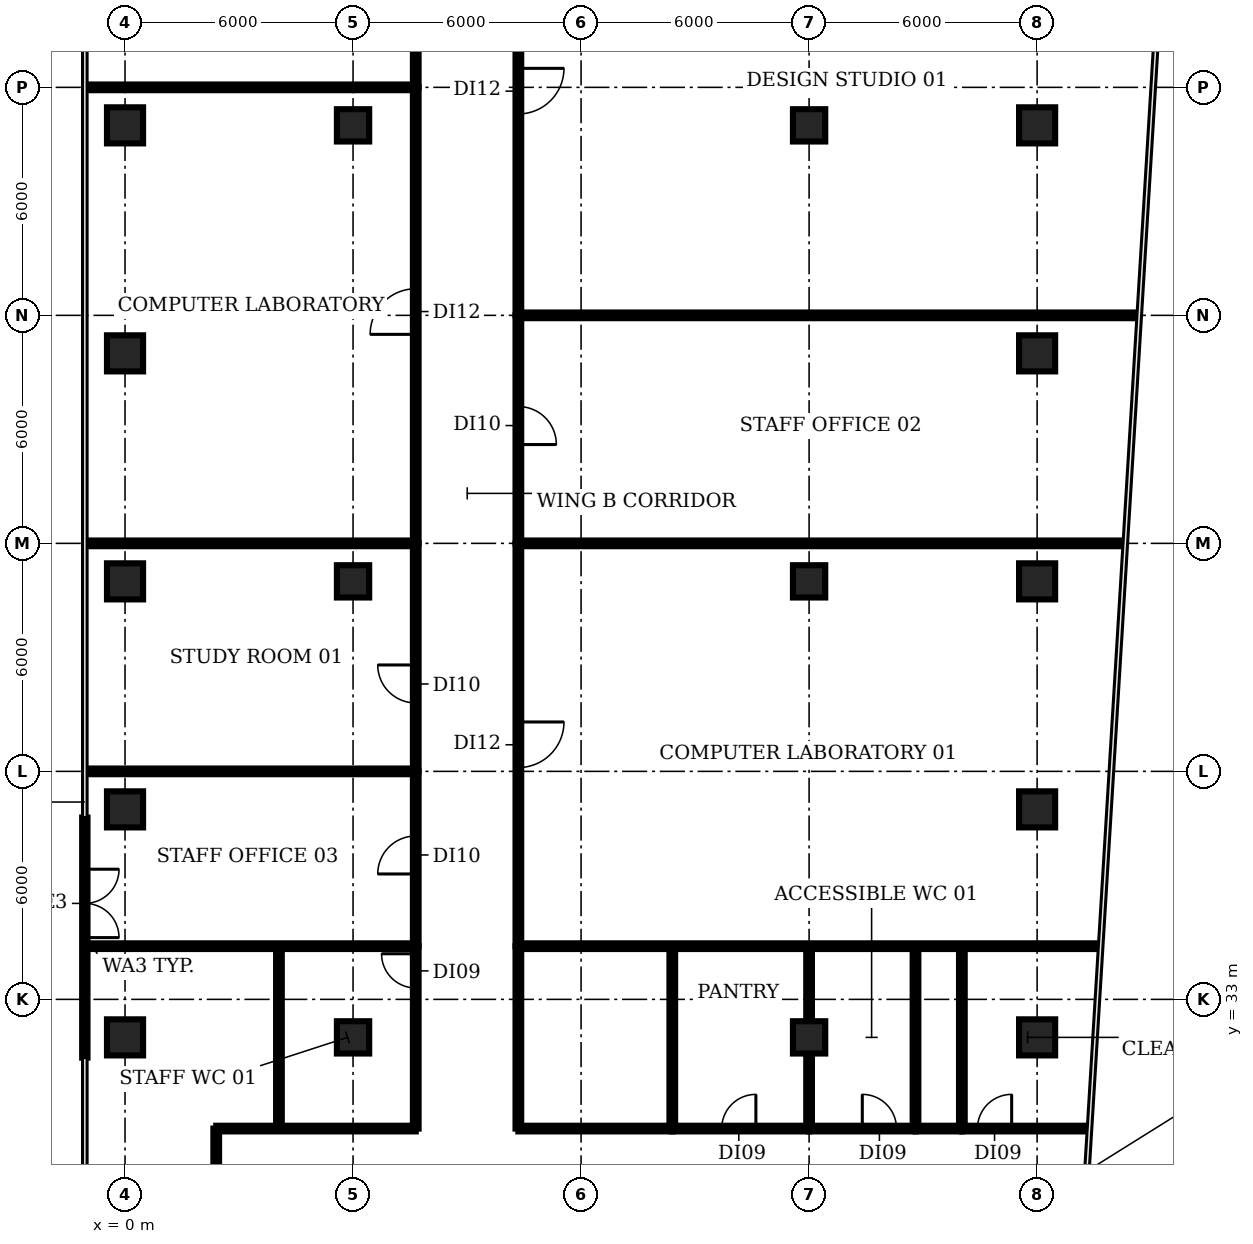
"""IFC4 building model, lengths in metres.
Left out: names, types, materials, properties, quantities, classifications, styles, units other than length and angle.
Written with IfcOpenShell. Run it as: python <this file> out.ifc"""

import sys

from ifc_helpers import new_model, si_unit, direction, frame, frame_2d, origin, origin_2d, place, context, subcontext, project, spatial, rectangle, extrude, element, fill, save


model = new_model("IFC4")
c1 = context("Model", 3, precision=1e-05, world=origin(), true_north=direction((0.0, 1.0)))
c2 = subcontext(c1, "Body", "Model", "MODEL_VIEW")
j1 = project(units=[si_unit("LENGTHUNIT", "METRE"), si_unit("PLANEANGLEUNIT", "RADIAN")], contexts=[c1])
p1 = place(None, origin())
s1 = spatial("IfcSite", under=j1, at=p1, CompositionType="ELEMENT")
p2 = place(p1, origin())
s2 = spatial("IfcBuilding", under=s1, at=p2, CompositionType="ELEMENT")
p3 = place(p2, frame((0.0, 0.0, 37.4)))
s3 = spatial("IfcBuildingStorey", under=s2, at=p3, CompositionType="ELEMENT", Elevation=37.4)
for number, where, z_axis, x_axis in (
    (1, (0.0, 32.0, 0.0), (0.0, 0.0, 1.0), (1.0, 0.0, 0.0)),
    (2, (0.0, 38.0, 0.0), (0.0, 0.0, 1.0), (1.0, 0.0, 0.0)),
    (3, (0.0, 44.0, 0.0), (0.0, 0.0, 1.0), (1.0, 0.0, 0.0)),
    (4, (0.0, 50.0, 0.0), (0.0, 0.0, 1.0), (1.0, 0.0, 0.0)),
    (5, (0.0, 56.0, 0.0), (0.0, 0.0, 1.0), (1.0, 0.0, 0.0)),
):
    element("IfcColumn", number, at=place(p3, frame(where, z_axis=z_axis, x_axis=x_axis)), inside=s3, PredefinedType="COLUMN", context=c2, shape_type="SweptSolid", body=[
        extrude(rectangle(XDim=0.95, YDim=0.95, at=origin_2d()), origin(), (0.0, 0.0, 1.0), 3.85),
    ])
for number, where, z_axis, x_axis in (
    (6, (6.0, 32.0, 0.0), (0.0, 0.0, 1.0), (1.0, 0.0, 0.0)),
    (7, (6.0, 44.0, 0.0), (0.0, 0.0, 1.0), (1.0, 0.0, 0.0)),
    (8, (6.0, 56.0, 0.0), (0.0, 0.0, 1.0), (1.0, 0.0, 0.0)),
    (9, (18.0, 32.0, 0.0), (0.0, 0.0, 1.0), (1.0, 0.0, 0.0)),
    (10, (18.0, 44.0, 0.0), (0.0, 0.0, 1.0), (1.0, 0.0, 0.0)),
    (11, (18.0, 56.0, 0.0), (0.0, 0.0, 1.0), (1.0, 0.0, 0.0)),
):
    element("IfcColumn", number, at=place(p3, frame(where, z_axis=z_axis, x_axis=x_axis)), inside=s3, PredefinedType="COLUMN", context=c2, shape_type="SweptSolid", body=[
        extrude(rectangle(XDim=0.85, YDim=0.85, at=origin_2d()), origin(), (0.0, 0.0, 1.0), 3.85),
    ])
for number, where, z_axis, x_axis in (
    (12, (24.0, 32.0, 0.0), (0.0, 0.0, 1.0), (1.0, 0.0, 0.0)),
    (13, (24.0, 38.0, 0.0), (0.0, 0.0, 1.0), (1.0, 0.0, 0.0)),
    (14, (24.0, 44.0, 0.0), (0.0, 0.0, 1.0), (1.0, 0.0, 0.0)),
    (15, (24.0, 50.0, 0.0), (0.0, 0.0, 1.0), (1.0, 0.0, 0.0)),
    (16, (24.0, 56.0, 0.0), (0.0, 0.0, 1.0), (1.0, 0.0, 0.0)),
):
    element("IfcColumn", number, at=place(p3, frame(where, z_axis=z_axis, x_axis=x_axis)), inside=s3, PredefinedType="COLUMN", context=c2, shape_type="SweptSolid", body=[
        extrude(rectangle(XDim=0.95, YDim=0.95, at=origin_2d()), origin(), (0.0, 0.0, 1.0), 3.85),
    ])
p4 = place(p3, frame((-1.058, 37.784, 0.0), z_axis=(0.0, 0.0, 1.0), x_axis=(0.0, -1.0, 0.0)))
e17 = element("IfcWall", 17, at=p4, inside=s3, PredefinedType="SOLIDWALL", context=c2, shape_type="SweptSolid", body=[
    extrude(rectangle(XDim=6.317, YDim=0.14, at=frame_2d((3.158, 0.0))), origin(), (0.0, 0.0, 1.0), 3.85),
])
p5 = place(p4, frame((1.359, 0.0, 0.0)))
e18 = element("IfcOpeningElement", 18, at=p5, cuts=e17, PredefinedType="OPENING", context=c2, shape_type="SweptSolid", body=[
    extrude(rectangle(XDim=1.8, YDim=2.4, at=frame_2d((0.9, 1.2))), frame((0.0, 0.08, 0.0), z_axis=(0.0, -1.0, 0.0), x_axis=(1.0, 0.0, 0.0)), (0.0, 0.0, 1.0), 0.16),
])
for number, where, z_axis, x_axis in (
    (19, (-1.01, 34.4, 0.0), (0.0, 0.0, 1.0), (1.0, 0.0, 0.0)),
    (20, (-1.01, 39.0, 0.0), (0.0, 0.0, 1.0), (1.0, 0.0, 0.0)),
    (21, (-1.01, 45.0, 0.0), (0.0, 0.0, 1.0), (1.0, 0.0, 0.0)),
    (22, (-1.01, 57.0, 0.0), (0.0, 0.0, 1.0), (1.0, 0.0, 0.0)),
):
    element("IfcWall", number, at=place(p3, frame(where, z_axis=z_axis, x_axis=x_axis)), inside=s3, PredefinedType="PARTITIONING", context=c2, shape_type="SweptSolid", body=[
        extrude(rectangle(XDim=8.66, YDim=0.15, at=frame_2d((4.33, 0.0))), origin(), (0.0, 0.0, 1.0), 2.83),
    ])
p6 = place(p3, frame((2.4, 25.7, 0.0), z_axis=(0.0, 0.0, 1.0), x_axis=(0.0, 1.0, 0.0)))
e23 = element("IfcWall", 23, at=p6, inside=s3, PredefinedType="PARTITIONING", context=c2, shape_type="SweptSolid", body=[
    extrude(rectangle(XDim=3.9, YDim=0.15, at=frame_2d((1.95, 0.0))), origin(), (0.0, 0.0, 1.0), 2.83),
])
p7 = place(p3, frame((2.4, 29.6, 0.0), z_axis=(0.0, 0.0, 1.0), x_axis=(1.0, 0.0, 0.0)))
e24 = element("IfcWall", 24, at=p7, inside=s3, PredefinedType="PARTITIONING", context=c2, shape_type="SweptSolid", body=[
    extrude(rectangle(XDim=5.25, YDim=0.15, at=frame_2d((2.625, 0.0))), origin(), (0.0, 0.0, 1.0), 2.83),
])
p8 = place(p3, frame((4.05, 29.6, 0.0), z_axis=(0.0, 0.0, 1.0), x_axis=(0.0, 1.0, 0.0)))
e25 = element("IfcWall", 25, at=p8, inside=s3, PredefinedType="PARTITIONING", context=c2, shape_type="SweptSolid", body=[
    extrude(rectangle(XDim=4.8, YDim=0.15, at=frame_2d((2.4, 0.0))), origin(), (0.0, 0.0, 1.0), 2.83),
])
p9 = place(p3, frame((7.65, 29.6, 0.0), z_axis=(0.0, 0.0, 1.0), x_axis=(0.0, 1.0, 0.0)))
e26 = element("IfcWall", 26, at=p9, inside=s3, PredefinedType="PARTITIONING", context=c2, shape_type="SweptSolid", body=[
    extrude(rectangle(XDim=4.8, YDim=0.15, at=frame_2d((2.4, 0.0))), origin(), (0.0, 0.0, 1.0), 2.83),
])
p10 = place(p9, frame((3.7, 0.0, 0.0)))
e27 = element("IfcOpeningElement", 27, at=p10, cuts=e26, PredefinedType="OPENING", context=c2, shape_type="SweptSolid", body=[
    extrude(rectangle(XDim=0.9, YDim=2.1, at=frame_2d((0.45, 1.05))), frame((0.0, 0.085, 0.0), z_axis=(0.0, -1.0, 0.0), x_axis=(1.0, 0.0, 0.0)), (0.0, 0.0, 1.0), 0.17),
])
p11 = place(p3, frame((7.65, 34.4, 0.0), z_axis=(0.0, 0.0, 1.0), x_axis=(0.0, 1.0, 0.0)))
e28 = element("IfcWall", 28, at=p11, inside=s3, PredefinedType="PARTITIONING", context=c2, shape_type="SweptSolid", body=[
    extrude(rectangle(XDim=4.6, YDim=0.15, at=frame_2d((2.3, 0.0))), origin(), (0.0, 0.0, 1.0), 2.83),
])
p12 = place(p11, frame((1.9, 0.0, 0.0)))
e29 = element("IfcOpeningElement", 29, at=p12, cuts=e28, PredefinedType="OPENING", context=c2, shape_type="SweptSolid", body=[
    extrude(rectangle(XDim=1.0, YDim=2.1, at=frame_2d((0.5, 1.05))), frame((0.0, 0.085, 0.0), z_axis=(0.0, -1.0, 0.0), x_axis=(1.0, 0.0, 0.0)), (0.0, 0.0, 1.0), 0.17),
])
p13 = place(p3, frame((7.65, 39.0, 0.0), z_axis=(0.0, 0.0, 1.0), x_axis=(0.0, 1.0, 0.0)))
e30 = element("IfcWall", 30, at=p13, inside=s3, PredefinedType="PARTITIONING", context=c2, shape_type="SweptSolid", body=[
    extrude(rectangle(XDim=6.0, YDim=0.15, at=frame_2d((3.0, 0.0))), origin(), (0.0, 0.0, 1.0), 2.83),
])
p14 = place(p13, frame((1.8, 0.0, 0.0)))
e31 = element("IfcOpeningElement", 31, at=p14, cuts=e30, PredefinedType="OPENING", context=c2, shape_type="SweptSolid", body=[
    extrude(rectangle(XDim=1.0, YDim=2.1, at=frame_2d((0.5, 1.05))), frame((0.0, 0.085, 0.0), z_axis=(0.0, -1.0, 0.0), x_axis=(1.0, 0.0, 0.0)), (0.0, 0.0, 1.0), 0.17),
])
p15 = place(p3, frame((7.65, 45.0, 0.0), z_axis=(0.0, 0.0, 1.0), x_axis=(0.0, 1.0, 0.0)))
e32 = element("IfcWall", 32, at=p15, inside=s3, PredefinedType="PARTITIONING", context=c2, shape_type="SweptSolid", body=[
    extrude(rectangle(XDim=12.0, YDim=0.15, at=frame_2d((6.0, 0.0))), origin(), (0.0, 0.0, 1.0), 2.83),
])
p16 = place(p15, frame((5.5, 0.0, 0.0)))
e33 = element("IfcOpeningElement", 33, at=p16, cuts=e32, PredefinedType="OPENING", context=c2, shape_type="SweptSolid", body=[
    extrude(rectangle(XDim=1.2, YDim=2.1, at=frame_2d((0.6, 1.05))), frame((0.0, 0.085, 0.0), z_axis=(0.0, -1.0, 0.0), x_axis=(1.0, 0.0, 0.0)), (0.0, 0.0, 1.0), 0.17),
])
p17 = place(p3, frame((7.65, 57.0, 0.0), z_axis=(0.0, 0.0, 1.0), x_axis=(0.0, 1.0, 0.0)))
e34 = element("IfcWall", 34, at=p17, inside=s3, PredefinedType="PARTITIONING", context=c2, shape_type="SweptSolid", body=[
    extrude(rectangle(XDim=6.02, YDim=0.15, at=frame_2d((3.01, 0.0))), origin(), (0.0, 0.0, 1.0), 2.83),
])
p18 = place(p17, frame((1.82, 0.0, 0.0)))
e35 = element("IfcOpeningElement", 35, at=p18, cuts=e34, PredefinedType="OPENING", context=c2, shape_type="SweptSolid", body=[
    extrude(rectangle(XDim=1.0, YDim=2.1, at=frame_2d((0.5, 1.05))), frame((0.0, 0.085, 0.0), z_axis=(0.0, -1.0, 0.0), x_axis=(1.0, 0.0, 0.0)), (0.0, 0.0, 1.0), 0.17),
])
p19 = place(p3, frame((10.35, 29.6, 0.0), z_axis=(0.0, 0.0, 1.0), x_axis=(0.0, 1.0, 0.0)))
e36 = element("IfcWall", 36, at=p19, inside=s3, PredefinedType="PARTITIONING", context=c2, shape_type="SweptSolid", body=[
    extrude(rectangle(XDim=4.8, YDim=0.15, at=frame_2d((2.4, 0.0))), origin(), (0.0, 0.0, 1.0), 2.83),
])
p20 = place(p3, frame((10.35, 29.6, 0.0), z_axis=(0.0, 0.0, 1.0), x_axis=(1.0, 0.0, 0.0)))
e37 = element("IfcWall", 37, at=p20, inside=s3, PredefinedType="PARTITIONING", context=c2, shape_type="SweptSolid", body=[
    extrude(rectangle(XDim=4.05, YDim=0.15, at=frame_2d((2.025, 0.0))), origin(), (0.0, 0.0, 1.0), 2.83),
])
p21 = place(p3, frame((10.35, 34.4, 0.0), z_axis=(0.0, 0.0, 1.0), x_axis=(1.0, 0.0, 0.0)))
e38 = element("IfcWall", 38, at=p21, inside=s3, PredefinedType="PARTITIONING", context=c2, shape_type="SweptSolid", body=[
    extrude(rectangle(XDim=15.27, YDim=0.15, at=frame_2d((7.635, 0.0))), origin(), (0.0, 0.0, 1.0), 2.83),
])
p22 = place(p3, frame((10.35, 45.0, 0.0), z_axis=(0.0, 0.0, 1.0), x_axis=(0.0, -1.0, 0.0)))
e39 = element("IfcWall", 39, at=p22, inside=s3, PredefinedType="PARTITIONING", context=c2, shape_type="SweptSolid", body=[
    extrude(rectangle(XDim=10.6, YDim=0.15, at=frame_2d((5.3, 0.0))), origin(), (0.0, 0.0, 1.0), 2.83),
])
p23 = place(p22, frame((4.7, 0.0, 0.0)))
e40 = element("IfcOpeningElement", 40, at=p23, cuts=e39, PredefinedType="OPENING", context=c2, shape_type="SweptSolid", body=[
    extrude(rectangle(XDim=1.2, YDim=2.1, at=frame_2d((0.6, 1.05))), frame((0.0, 0.085, 0.0), z_axis=(0.0, -1.0, 0.0), x_axis=(1.0, 0.0, 0.0)), (0.0, 0.0, 1.0), 0.17),
])
p24 = place(p3, frame((10.35, 45.0, 0.0), z_axis=(0.0, 0.0, 1.0), x_axis=(1.0, 0.0, 0.0)))
e41 = element("IfcWall", 41, at=p24, inside=s3, PredefinedType="PARTITIONING", context=c2, shape_type="SweptSolid", body=[
    extrude(rectangle(XDim=15.92, YDim=0.15, at=frame_2d((7.96, 0.0))), origin(), (0.0, 0.0, 1.0), 2.83),
])
p25 = place(p3, frame((10.35, 51.0, 0.0), z_axis=(0.0, 0.0, 1.0), x_axis=(0.0, -1.0, 0.0)))
e42 = element("IfcWall", 42, at=p25, inside=s3, PredefinedType="PARTITIONING", context=c2, shape_type="SweptSolid", body=[
    extrude(rectangle(XDim=6.0, YDim=0.15, at=frame_2d((3.0, 0.0))), origin(), (0.0, 0.0, 1.0), 2.83),
])
p26 = place(p25, frame((2.4, 0.0, 0.0)))
e43 = element("IfcOpeningElement", 43, at=p26, cuts=e42, PredefinedType="OPENING", context=c2, shape_type="SweptSolid", body=[
    extrude(rectangle(XDim=1.0, YDim=2.1, at=frame_2d((0.5, 1.05))), frame((0.0, 0.085, 0.0), z_axis=(0.0, -1.0, 0.0), x_axis=(1.0, 0.0, 0.0)), (0.0, 0.0, 1.0), 0.17),
])
p27 = place(p3, frame((10.35, 51.0, 0.0), z_axis=(0.0, 0.0, 1.0), x_axis=(1.0, 0.0, 0.0)))
e44 = element("IfcWall", 44, at=p27, inside=s3, PredefinedType="PARTITIONING", context=c2, shape_type="SweptSolid", body=[
    extrude(rectangle(XDim=16.269, YDim=0.15, at=frame_2d((8.134, 0.0))), origin(), (0.0, 0.0, 1.0), 2.83),
])
p28 = place(p3, frame((10.35, 63.015, 0.0), z_axis=(0.0, 0.0, 1.0), x_axis=(0.0, -1.0, 0.0)))
e45 = element("IfcWall", 45, at=p28, inside=s3, PredefinedType="PARTITIONING", context=c2, shape_type="SweptSolid", body=[
    extrude(rectangle(XDim=12.015, YDim=0.15, at=frame_2d((6.007, 0.0))), origin(), (0.0, 0.0, 1.0), 2.83),
])
p29 = place(p28, frame((5.515, 0.0, 0.0)))
e46 = element("IfcOpeningElement", 46, at=p29, cuts=e45, PredefinedType="OPENING", context=c2, shape_type="SweptSolid", body=[
    extrude(rectangle(XDim=1.2, YDim=2.1, at=frame_2d((0.6, 1.05))), frame((0.0, 0.085, 0.0), z_axis=(0.0, -1.0, 0.0), x_axis=(1.0, 0.0, 0.0)), (0.0, 0.0, 1.0), 0.17),
])
p30 = place(p3, frame((14.4, 29.6, 0.0), z_axis=(0.0, 0.0, 1.0), x_axis=(0.0, 1.0, 0.0)))
e47 = element("IfcWall", 47, at=p30, inside=s3, PredefinedType="PARTITIONING", context=c2, shape_type="SweptSolid", body=[
    extrude(rectangle(XDim=4.8, YDim=0.15, at=frame_2d((2.4, 0.0))), origin(), (0.0, 0.0, 1.0), 2.83),
])
p31 = place(p3, frame((14.4, 29.6, 0.0), z_axis=(0.0, 0.0, 1.0), x_axis=(1.0, 0.0, 0.0)))
e48 = element("IfcWall", 48, at=p31, inside=s3, PredefinedType="PARTITIONING", context=c2, shape_type="SweptSolid", body=[
    extrude(rectangle(XDim=3.6, YDim=0.15, at=frame_2d((1.8, 0.0))), origin(), (0.0, 0.0, 1.0), 2.83),
])
p32 = place(p31, frame((1.3, 0.0, 0.0)))
e49 = element("IfcOpeningElement", 49, at=p32, cuts=e48, PredefinedType="OPENING", context=c2, shape_type="SweptSolid", body=[
    extrude(rectangle(XDim=0.9, YDim=2.1, at=frame_2d((0.45, 1.05))), frame((0.0, 0.085, 0.0), z_axis=(0.0, -1.0, 0.0), x_axis=(1.0, 0.0, 0.0)), (0.0, 0.0, 1.0), 0.17),
])
p33 = place(p3, frame((18.0, 29.6, 0.0), z_axis=(0.0, 0.0, 1.0), x_axis=(0.0, 1.0, 0.0)))
e50 = element("IfcWall", 50, at=p33, inside=s3, PredefinedType="PARTITIONING", context=c2, shape_type="SweptSolid", body=[
    extrude(rectangle(XDim=4.8, YDim=0.15, at=frame_2d((2.4, 0.0))), origin(), (0.0, 0.0, 1.0), 2.83),
])
p34 = place(p3, frame((18.0, 29.6, 0.0), z_axis=(0.0, 0.0, 1.0), x_axis=(1.0, 0.0, 0.0)))
e51 = element("IfcWall", 51, at=p34, inside=s3, PredefinedType="PARTITIONING", context=c2, shape_type="SweptSolid", body=[
    extrude(rectangle(XDim=2.8, YDim=0.15, at=frame_2d((1.4, 0.0))), origin(), (0.0, 0.0, 1.0), 2.83),
])
p35 = place(p34, frame((1.4, 0.0, 0.0)))
e52 = element("IfcOpeningElement", 52, at=p35, cuts=e51, PredefinedType="OPENING", context=c2, shape_type="SweptSolid", body=[
    extrude(rectangle(XDim=0.9, YDim=2.1, at=frame_2d((0.45, 1.05))), frame((0.0, 0.085, 0.0), z_axis=(0.0, -1.0, 0.0), x_axis=(1.0, 0.0, 0.0)), (0.0, 0.0, 1.0), 0.17),
])
p36 = place(p3, frame((20.8, 29.6, 0.0), z_axis=(0.0, 0.0, 1.0), x_axis=(0.0, 1.0, 0.0)))
e53 = element("IfcWall", 53, at=p36, inside=s3, PredefinedType="PARTITIONING", context=c2, shape_type="SweptSolid", body=[
    extrude(rectangle(XDim=4.8, YDim=0.15, at=frame_2d((2.4, 0.0))), origin(), (0.0, 0.0, 1.0), 2.83),
])
p37 = place(p3, frame((20.8, 29.6, 0.0), z_axis=(0.0, 0.0, 1.0), x_axis=(1.0, 0.0, 0.0)))
e54 = element("IfcWall", 54, at=p37, inside=s3, PredefinedType="PARTITIONING", context=c2, shape_type="SweptSolid", body=[
    extrude(rectangle(XDim=1.22, YDim=0.15, at=frame_2d((0.61, 0.0))), origin(), (0.0, 0.0, 1.0), 2.83),
])
p38 = place(p3, frame((22.02, 29.6, 0.0), z_axis=(0.0, 0.0, 1.0), x_axis=(0.0, 1.0, 0.0)))
e55 = element("IfcWall", 55, at=p38, inside=s3, PredefinedType="PARTITIONING", context=c2, shape_type="SweptSolid", body=[
    extrude(rectangle(XDim=4.8, YDim=0.15, at=frame_2d((2.4, 0.0))), origin(), (0.0, 0.0, 1.0), 2.83),
])
p39 = place(p3, frame((22.02, 29.6, 0.0), z_axis=(0.0, 0.0, 1.0), x_axis=(1.0, 0.0, 0.0)))
e56 = element("IfcWall", 56, at=p39, inside=s3, PredefinedType="PARTITIONING", context=c2, shape_type="SweptSolid", body=[
    extrude(rectangle(XDim=3.31, YDim=0.15, at=frame_2d((1.655, 0.0))), origin(), (0.0, 0.0, 1.0), 2.83),
])
p40 = place(p39, frame((0.41, 0.0, 0.0)))
e57 = element("IfcOpeningElement", 57, at=p40, cuts=e56, PredefinedType="OPENING", context=c2, shape_type="SweptSolid", body=[
    extrude(rectangle(XDim=0.9, YDim=2.1, at=frame_2d((0.45, 1.05))), frame((0.0, 0.085, 0.0), z_axis=(0.0, -1.0, 0.0), x_axis=(1.0, 0.0, 0.0)), (0.0, 0.0, 1.0), 0.17),
])
p41 = place(p5, origin())
e58 = element("IfcDoor", 58, at=p41, inside=s3, OperationType="DOUBLE_DOOR_DOUBLE_SWING", PredefinedType="DOOR", context=c2, shape_type="SweptSolid", body=[
    extrude(rectangle(XDim=1.8, YDim=2.4, at=frame_2d((0.9, 1.2))), frame((0.0, 0.025, 0.0), z_axis=(0.0, -1.0, 0.0), x_axis=(1.0, 0.0, 0.0)), (0.0, 0.0, 1.0), 0.05),
])
fill(e18, e58)
p42 = place(p10, origin())
e59 = element("IfcDoor", 59, at=p42, inside=s3, OperationType="SINGLE_SWING_RIGHT", PredefinedType="DOOR", context=c2, shape_type="SweptSolid", body=[
    extrude(rectangle(XDim=0.9, YDim=2.1, at=frame_2d((0.45, 1.05))), frame((0.0, 0.025, 0.0), z_axis=(0.0, -1.0, 0.0), x_axis=(1.0, 0.0, 0.0)), (0.0, 0.0, 1.0), 0.05),
])
fill(e27, e59)
p43 = place(p12, origin())
e60 = element("IfcDoor", 60, at=p43, inside=s3, OperationType="SINGLE_SWING_LEFT", PredefinedType="DOOR", context=c2, shape_type="SweptSolid", body=[
    extrude(rectangle(XDim=1.0, YDim=2.1, at=frame_2d((0.5, 1.05))), frame((0.0, 0.025, 0.0), z_axis=(0.0, -1.0, 0.0), x_axis=(1.0, 0.0, 0.0)), (0.0, 0.0, 1.0), 0.05),
])
fill(e29, e60)
p44 = place(p14, origin())
e61 = element("IfcDoor", 61, at=p44, inside=s3, OperationType="SINGLE_SWING_RIGHT", PredefinedType="DOOR", context=c2, shape_type="SweptSolid", body=[
    extrude(rectangle(XDim=1.0, YDim=2.1, at=frame_2d((0.5, 1.05))), frame((0.0, 0.025, 0.0), z_axis=(0.0, -1.0, 0.0), x_axis=(1.0, 0.0, 0.0)), (0.0, 0.0, 1.0), 0.05),
])
fill(e31, e61)
p45 = place(p16, origin())
e62 = element("IfcDoor", 62, at=p45, inside=s3, OperationType="SINGLE_SWING_LEFT", PredefinedType="DOOR", context=c2, shape_type="SweptSolid", body=[
    extrude(rectangle(XDim=1.2, YDim=2.1, at=frame_2d((0.6, 1.05))), frame((0.0, 0.025, 0.0), z_axis=(0.0, -1.0, 0.0), x_axis=(1.0, 0.0, 0.0)), (0.0, 0.0, 1.0), 0.05),
])
fill(e33, e62)
p46 = place(p23, origin())
e63 = element("IfcDoor", 63, at=p46, inside=s3, OperationType="SINGLE_SWING_LEFT", PredefinedType="DOOR", context=c2, shape_type="SweptSolid", body=[
    extrude(rectangle(XDim=1.2, YDim=2.1, at=frame_2d((0.6, 1.05))), frame((0.0, 0.025, 0.0), z_axis=(0.0, -1.0, 0.0), x_axis=(1.0, 0.0, 0.0)), (0.0, 0.0, 1.0), 0.05),
])
fill(e40, e63)
p47 = place(p26, origin())
e64 = element("IfcDoor", 64, at=p47, inside=s3, OperationType="SINGLE_SWING_RIGHT", PredefinedType="DOOR", context=c2, shape_type="SweptSolid", body=[
    extrude(rectangle(XDim=1.0, YDim=2.1, at=frame_2d((0.5, 1.05))), frame((0.0, 0.025, 0.0), z_axis=(0.0, -1.0, 0.0), x_axis=(1.0, 0.0, 0.0)), (0.0, 0.0, 1.0), 0.05),
])
fill(e43, e64)
p48 = place(p29, origin())
e65 = element("IfcDoor", 65, at=p48, inside=s3, OperationType="SINGLE_SWING_LEFT", PredefinedType="DOOR", context=c2, shape_type="SweptSolid", body=[
    extrude(rectangle(XDim=1.2, YDim=2.1, at=frame_2d((0.6, 1.05))), frame((0.0, 0.025, 0.0), z_axis=(0.0, -1.0, 0.0), x_axis=(1.0, 0.0, 0.0)), (0.0, 0.0, 1.0), 0.05),
])
fill(e46, e65)
p49 = place(p32, origin())
e66 = element("IfcDoor", 66, at=p49, inside=s3, OperationType="SINGLE_SWING_RIGHT", PredefinedType="DOOR", context=c2, shape_type="SweptSolid", body=[
    extrude(rectangle(XDim=0.9, YDim=2.1, at=frame_2d((0.45, 1.05))), frame((0.0, 0.025, 0.0), z_axis=(0.0, -1.0, 0.0), x_axis=(1.0, 0.0, 0.0)), (0.0, 0.0, 1.0), 0.05),
])
fill(e49, e66)
p50 = place(p35, origin())
e67 = element("IfcDoor", 67, at=p50, inside=s3, OperationType="SINGLE_SWING_LEFT", PredefinedType="DOOR", context=c2, shape_type="SweptSolid", body=[
    extrude(rectangle(XDim=0.9, YDim=2.1, at=frame_2d((0.45, 1.05))), frame((0.0, 0.025, 0.0), z_axis=(0.0, -1.0, 0.0), x_axis=(1.0, 0.0, 0.0)), (0.0, 0.0, 1.0), 0.05),
])
fill(e52, e67)
p51 = place(p40, origin())
e68 = element("IfcDoor", 68, at=p51, inside=s3, OperationType="SINGLE_SWING_RIGHT", PredefinedType="DOOR", context=c2, shape_type="SweptSolid", body=[
    extrude(rectangle(XDim=0.9, YDim=2.1, at=frame_2d((0.45, 1.05))), frame((0.0, 0.025, 0.0), z_axis=(0.0, -1.0, 0.0), x_axis=(1.0, 0.0, 0.0)), (0.0, 0.0, 1.0), 0.05),
])
fill(e57, e68)
save(model, sys.argv[1])
